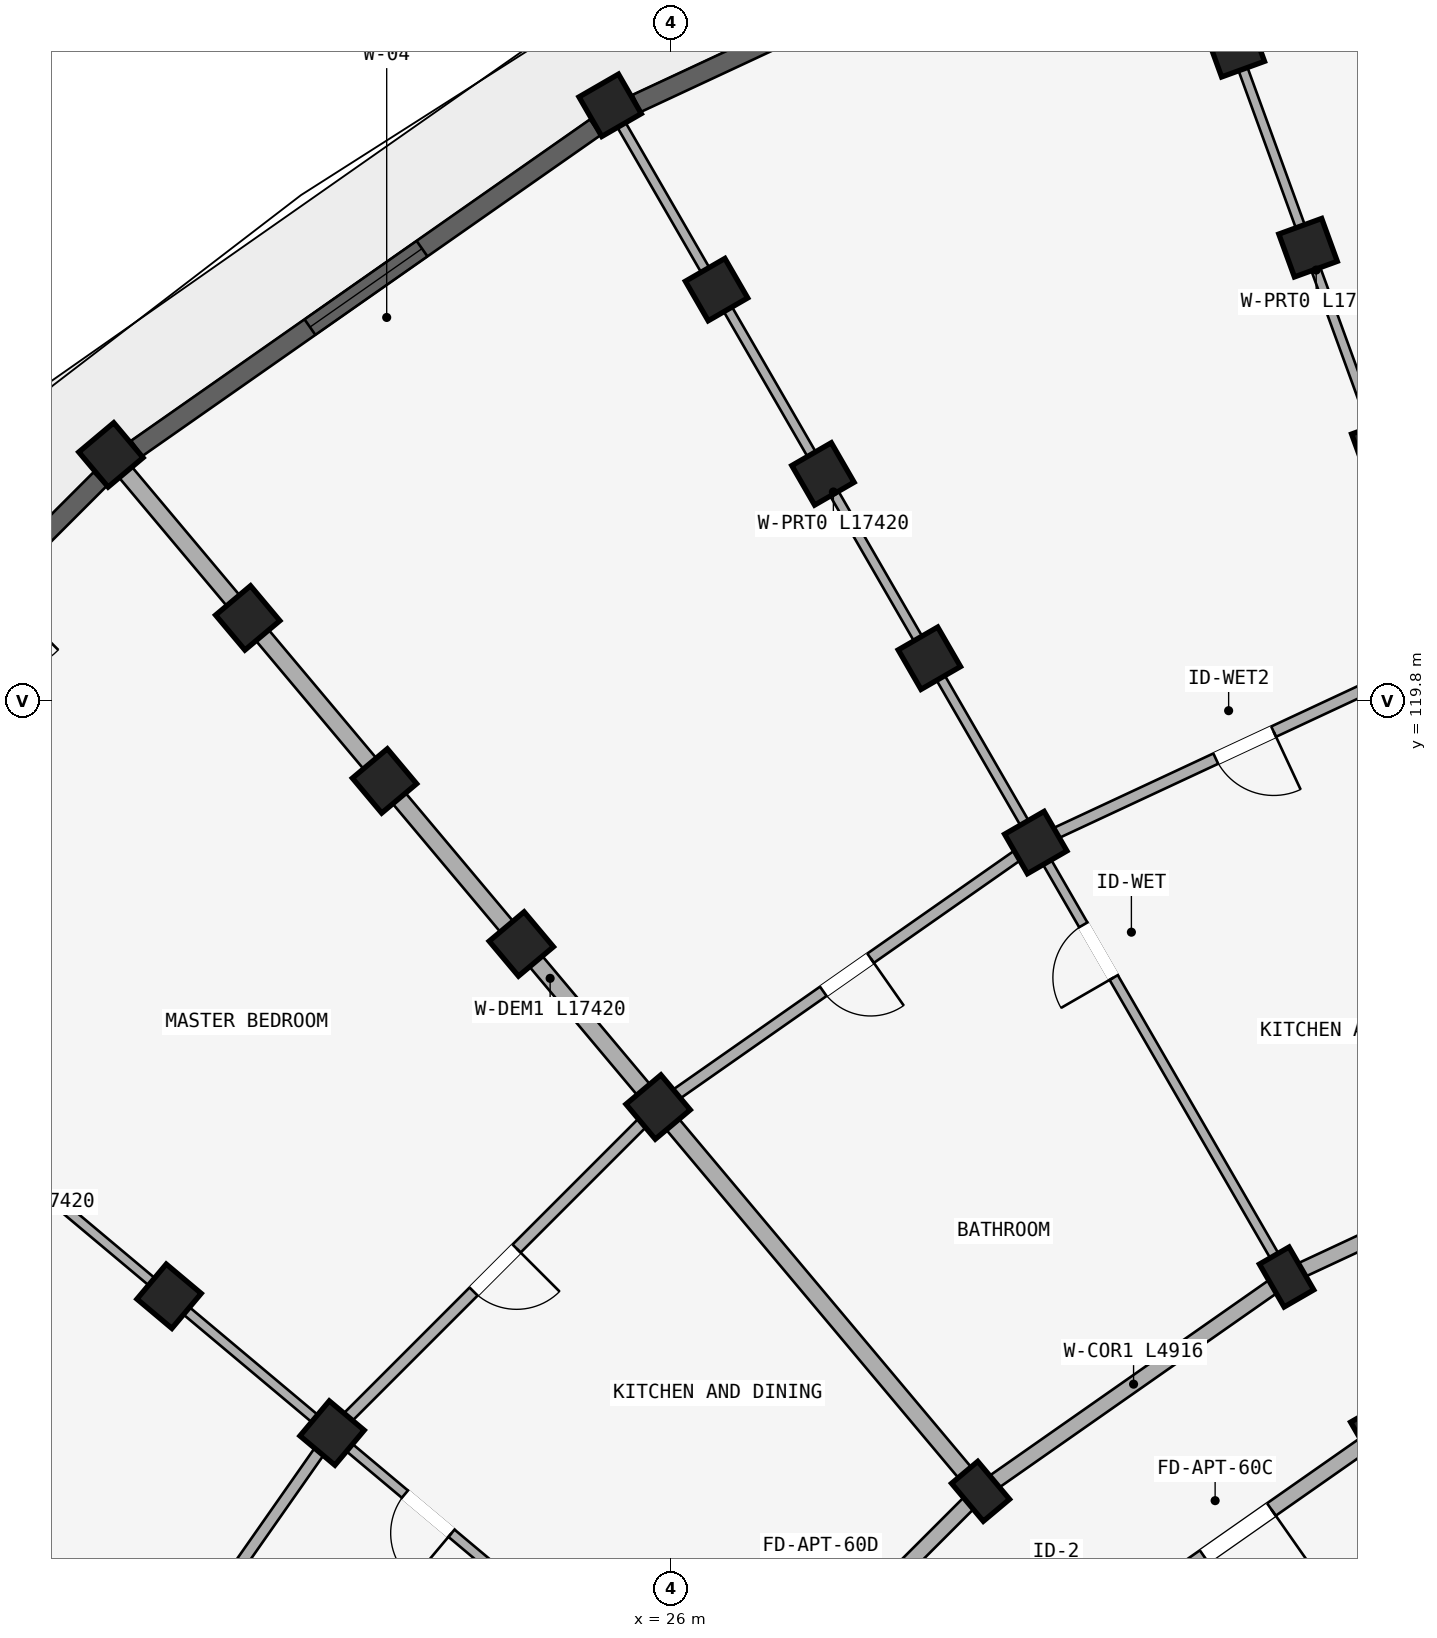
"""IFC4 building model, lengths in metres.
Left out: names, types, materials, properties, quantities, classifications, styles, units other than length and angle.
Written with IfcOpenShell. Run it as: python <this file> out.ifc"""

import sys

from ifc_helpers import new_model, si_unit, direction, frame, frame_2d, origin, origin_2d, place, context, subcontext, project, spatial, rectangle, extrude, element, fill, save


model = new_model("IFC4")
c1 = context("Model", 3, precision=1e-05, world=origin(), true_north=direction((0.0, 1.0)))
c2 = subcontext(c1, "Body", "Model", "MODEL_VIEW")
j1 = project(units=[si_unit("LENGTHUNIT", "METRE"), si_unit("PLANEANGLEUNIT", "RADIAN")], contexts=[c1])
p1 = place(None, origin())
s1 = spatial("IfcSite", under=j1, at=p1, CompositionType="ELEMENT")
p2 = place(p1, origin())
s2 = spatial("IfcBuilding", under=s1, at=p2, CompositionType="ELEMENT")
p3 = place(p2, frame((0.0, 0.0, 37.05)))
s3 = spatial("IfcBuildingStorey", under=s2, at=p3, CompositionType="ELEMENT", Elevation=37.05)
for number, where, z_axis, x_axis in (
    (1, (35.34, 123.132, 0.0), (0.0, 0.0, 1.0), (0.94, 0.342, 0.0)),
    (2, (34.382, 125.764, 0.0), (0.0, 0.0, 1.0), (0.94, 0.342, 0.0)),
    (3, (33.425, 128.395, 0.0), (0.0, 0.0, 1.0), (0.94, 0.342, 0.0)),
):
    element("IfcColumn", number, at=place(p3, frame(where, z_axis=z_axis, x_axis=x_axis)), inside=s3, PredefinedType="COLUMN", context=c2, shape_type="SweptSolid", body=[
        extrude(rectangle(XDim=0.6, YDim=0.6, at=origin_2d()), origin(), (0.0, 0.0, 1.0), 2.93),
    ])
for number, where, z_axis, x_axis in (
    (4, (35.3, 110.144, 0.0), (0.0, 0.0, 1.0), (0.866, 0.5, 0.0)),
    (5, (34.1, 112.222, 0.0), (0.0, 0.0, 1.0), (0.866, 0.5, 0.0)),
):
    element("IfcColumn", number, at=place(p3, frame(where, z_axis=z_axis, x_axis=x_axis)), inside=s3, PredefinedType="COLUMN", context=c2, shape_type="SweptSolid", body=[
        extrude(rectangle(XDim=0.45, YDim=0.65, at=origin_2d()), origin(), (0.0, 0.0, 1.0), 2.93),
    ])
for number, where, z_axis, x_axis in (
    (6, (30.8, 117.938, 0.0), (0.0, 0.0, 1.0), (0.866, 0.5, 0.0)),
    (7, (29.4, 120.363, 0.0), (0.0, 0.0, 1.0), (0.866, 0.5, 0.0)),
    (8, (28.0, 122.787, 0.0), (0.0, 0.0, 1.0), (0.866, 0.5, 0.0)),
    (9, (26.6, 125.212, 0.0), (0.0, 0.0, 1.0), (0.866, 0.5, 0.0)),
):
    element("IfcColumn", number, at=place(p3, frame(where, z_axis=z_axis, x_axis=x_axis)), inside=s3, PredefinedType="COLUMN", context=c2, shape_type="SweptSolid", body=[
        extrude(rectangle(XDim=0.6, YDim=0.6, at=origin_2d()), origin(), (0.0, 0.0, 1.0), 2.93),
    ])
p4 = place(p3, frame((25.2, 127.637, 0.0), z_axis=(0.0, 0.0, 1.0), x_axis=(0.866025403784, 0.5, 0.0)))
e10 = element("IfcColumn", 10, at=p4, inside=s3, PredefinedType="COLUMN", context=c2, shape_type="SweptSolid", body=[
    extrude(rectangle(XDim=0.6, YDim=0.6, at=origin_2d()), origin(), (0.0, 0.0, 1.0), 2.97),
])
p5 = place(p3, frame((30.073, 109.402, 0.0), z_axis=(0.0, 0.0, 1.0), x_axis=(0.766044443119, 0.642787609687, 0.0)))
e11 = element("IfcColumn", 11, at=p5, inside=s3, PredefinedType="COLUMN", context=c2, shape_type="SweptSolid", body=[
    extrude(rectangle(XDim=0.45, YDim=0.65, at=origin_2d()), origin(), (0.0, 0.0, 1.0), 2.93),
])
for number, where, z_axis, x_axis in (
    (12, (25.831, 114.458, 0.0), (0.0, 0.0, 1.0), (0.766, 0.643, 0.0)),
    (13, (24.031, 116.603, 0.0), (0.0, 0.0, 1.0), (0.766, 0.643, 0.0)),
    (14, (22.231, 118.748, 0.0), (0.0, 0.0, 1.0), (0.766, 0.643, 0.0)),
    (15, (20.432, 120.893, 0.0), (0.0, 0.0, 1.0), (0.766, 0.643, 0.0)),
):
    element("IfcColumn", number, at=place(p3, frame(where, z_axis=z_axis, x_axis=x_axis)), inside=s3, PredefinedType="COLUMN", context=c2, shape_type="SweptSolid", body=[
        extrude(rectangle(XDim=0.6, YDim=0.6, at=origin_2d()), origin(), (0.0, 0.0, 1.0), 2.93),
    ])
p6 = place(p3, frame((18.632, 123.038, 0.0), z_axis=(0.0, 0.0, 1.0), x_axis=(0.766044443119, 0.642787609687, 0.0)))
e16 = element("IfcColumn", 16, at=p6, inside=s3, PredefinedType="COLUMN", context=c2, shape_type="SweptSolid", body=[
    extrude(rectangle(XDim=0.6, YDim=0.6, at=origin_2d()), origin(), (0.0, 0.0, 1.0), 2.97),
])
for number, where, z_axis, x_axis in (
    (17, (21.542, 110.169, 0.0), (0.0, 0.0, 1.0), (0.643, 0.766, 0.0)),
    (18, (19.397, 111.969, 0.0), (0.0, 0.0, 1.0), (0.643, 0.766, 0.0)),
):
    element("IfcColumn", number, at=place(p3, frame(where, z_axis=z_axis, x_axis=x_axis)), inside=s3, PredefinedType="COLUMN", context=c2, shape_type="SweptSolid", body=[
        extrude(rectangle(XDim=0.6, YDim=0.6, at=origin_2d()), origin(), (0.0, 0.0, 1.0), 2.93),
    ])
p7 = place(p3, frame((38.555, 114.299, 0.0), z_axis=(0.0, 0.0, 1.0), x_axis=(-0.906302381024, -0.422629854778, 0.0)))
e19 = element("IfcWall", 19, at=p7, inside=s3, PredefinedType="STANDARD", context=c2, shape_type="SweptSolid", body=[
    extrude(rectangle(XDim=4.915, YDim=0.2, at=frame_2d((2.458, 0.0))), origin(), (0.0, 0.0, 1.0), 2.372),
])
p8 = place(p3, frame((35.3, 110.144, 0.0), z_axis=(0.0, 0.0, 1.0), x_axis=(-0.819155404658, -0.573571637217, 0.0)))
e20 = element("IfcWall", 20, at=p8, inside=s3, PredefinedType="STANDARD", context=c2, shape_type="SweptSolid", body=[
    extrude(rectangle(XDim=4.497, YDim=0.2, at=frame_2d((2.249, 0.0))), origin(), (0.0, 0.0, 1.0), 2.372),
])
p9 = place(p8, frame((1.709, 0.0, 0.0)))
e21 = element("IfcOpeningElement", 21, at=p9, cuts=e20, PredefinedType="OPENING", context=c2, shape_type="SweptSolid", body=[
    extrude(rectangle(XDim=1.08, YDim=2.15, at=frame_2d((0.54, 1.075))), frame((0.0, 0.11, 0.0), z_axis=(0.0, -1.0, 0.0), x_axis=(1.0, 0.0, 0.0)), (0.0, 0.0, 1.0), 0.22),
])
p10 = place(p3, frame((34.1, 112.222, 0.0), z_axis=(0.0, 0.0, 1.0), x_axis=(-0.819140911474, -0.573592335331, 0.0)))
e22 = element("IfcWall", 22, at=p10, inside=s3, PredefinedType="STANDARD", context=c2, shape_type="SweptSolid", body=[
    extrude(rectangle(XDim=4.916, YDim=0.2, at=frame_2d((2.458, 0.0))), origin(), (0.0, 0.0, 1.0), 2.372),
])
p11 = place(p3, frame((30.073, 109.402, 0.0), z_axis=(0.0, 0.0, 1.0), x_axis=(-0.707106781187, -0.707106781187, 0.0)))
e23 = element("IfcWall", 23, at=p11, inside=s3, PredefinedType="STANDARD", context=c2, shape_type="SweptSolid", body=[
    extrude(rectangle(XDim=4.916, YDim=0.2, at=frame_2d((2.458, 0.0))), origin(), (0.0, 0.0, 1.0), 2.372),
])
p12 = place(p11, frame((1.888, 0.0, 0.0)))
e24 = element("IfcOpeningElement", 24, at=p12, cuts=e23, PredefinedType="OPENING", context=c2, shape_type="SweptSolid", body=[
    extrude(rectangle(XDim=1.14, YDim=2.15, at=frame_2d((0.57, 1.075))), frame((0.0, 0.11, 0.0), z_axis=(0.0, -1.0, 0.0), x_axis=(1.0, 0.0, 0.0)), (0.0, 0.0, 1.0), 0.22),
])
p13 = place(p3, frame((38.521, 114.393, 0.0), z_axis=(0.0, 0.0, 1.0), x_axis=(-0.342022120477, 0.939691901159, 0.0)))
e25 = element("IfcWall", 25, at=p13, inside=s3, PredefinedType="PARTITIONING", context=c2, shape_type="SweptSolid", body=[
    extrude(rectangle(XDim=17.42, YDim=0.125, at=frame_2d((8.71, 0.0))), origin(), (0.0, 0.0, 1.0), 2.372),
])
p14 = place(p13, frame((4.45, 0.0, 0.0)))
e26 = element("IfcOpeningElement", 26, at=p14, cuts=e25, PredefinedType="OPENING", context=c2, shape_type="SweptSolid", body=[
    extrude(rectangle(XDim=0.8, YDim=2.1, at=frame_2d((0.4, 1.05))), frame((0.0, 0.073, 0.0), z_axis=(0.0, -1.0, 0.0), x_axis=(1.0, 0.0, 0.0)), (0.0, 0.0, 1.0), 0.145),
])
p15 = place(p3, frame((34.05, 112.309, 0.0), z_axis=(0.0, 0.0, 1.0), x_axis=(-0.499997843263, 0.866026648973, 0.0)))
e27 = element("IfcWall", 27, at=p15, inside=s3, PredefinedType="PARTITIONING", context=c2, shape_type="SweptSolid", body=[
    extrude(rectangle(XDim=17.42, YDim=0.125, at=frame_2d((8.71, 0.0))), origin(), (0.0, 0.0, 1.0), 2.372),
])
p16 = place(p15, frame((4.45, 0.0, 0.0)))
e28 = element("IfcOpeningElement", 28, at=p16, cuts=e27, PredefinedType="OPENING", context=c2, shape_type="SweptSolid", body=[
    extrude(rectangle(XDim=0.8, YDim=2.1, at=frame_2d((0.4, 1.05))), frame((0.0, 0.073, 0.0), z_axis=(0.0, -1.0, 0.0), x_axis=(1.0, 0.0, 0.0)), (0.0, 0.0, 1.0), 0.145),
])
p17 = place(p3, frame((30.009, 109.479, 0.0), z_axis=(0.0, 0.0, 1.0), x_axis=(-0.642784757967, 0.766046835987, 0.0)))
e29 = element("IfcWall", 29, at=p17, inside=s3, PredefinedType="STANDARD", context=c2, shape_type="SweptSolid", body=[
    extrude(rectangle(XDim=17.42, YDim=0.22, at=frame_2d((8.71, 0.0))), origin(), (0.0, 0.0, 1.0), 2.372),
])
p18 = place(p3, frame((26.521, 105.991, 0.0), z_axis=(0.0, 0.0, 1.0), x_axis=(-0.766046835987, 0.642784757967, 0.0)))
e30 = element("IfcWall", 30, at=p18, inside=s3, PredefinedType="PARTITIONING", context=c2, shape_type="SweptSolid", body=[
    extrude(rectangle(XDim=17.42, YDim=0.125, at=frame_2d((8.71, 0.0))), origin(), (0.0, 0.0, 1.0), 2.372),
])
p19 = place(p18, frame((4.45, 0.0, 0.0)))
e31 = element("IfcOpeningElement", 31, at=p19, cuts=e30, PredefinedType="OPENING", context=c2, shape_type="SweptSolid", body=[
    extrude(rectangle(XDim=0.8, YDim=2.1, at=frame_2d((0.4, 1.05))), frame((0.0, 0.073, 0.0), z_axis=(0.0, -1.0, 0.0), x_axis=(1.0, 0.0, 0.0)), (0.0, 0.0, 1.0), 0.145),
])
p20 = place(p3, frame((23.691, 101.95, 0.0), z_axis=(0.0, 0.0, 1.0), x_axis=(-0.866026648973, 0.499997843263, 0.0)))
e32 = element("IfcWall", 32, at=p20, inside=s3, PredefinedType="STANDARD", context=c2, shape_type="SweptSolid", body=[
    extrude(rectangle(XDim=17.42, YDim=0.22, at=frame_2d((8.71, 0.0))), origin(), (0.0, 0.0, 1.0), 2.372),
])
p21 = place(p3, frame((36.298, 120.501, 0.0), z_axis=(0.0, 0.0, 1.0), x_axis=(-0.906312656069, -0.42260781991, 0.0)))
e33 = element("IfcWall", 33, at=p21, inside=s3, PredefinedType="PLUMBINGWALL", context=c2, shape_type="SweptSolid", body=[
    extrude(rectangle(XDim=6.066, YDim=0.15, at=frame_2d((3.033, 0.0))), origin(), (0.0, 0.0, 1.0), 2.372),
])
p22 = place(p21, frame((2.613, 0.0, 0.0)))
e34 = element("IfcOpeningElement", 34, at=p22, cuts=e33, PredefinedType="OPENING", context=c2, shape_type="SweptSolid", body=[
    extrude(rectangle(XDim=0.84, YDim=2.1, at=frame_2d((0.42, 1.05))), frame((0.0, 0.085, 0.0), z_axis=(0.0, -1.0, 0.0), x_axis=(1.0, 0.0, 0.0)), (0.0, 0.0, 1.0), 0.17),
])
p23 = place(p3, frame((30.8, 117.938, 0.0), z_axis=(0.0, 0.0, 1.0), x_axis=(-0.81913926159, -0.573594691504, 0.0)))
e35 = element("IfcWall", 35, at=p23, inside=s3, PredefinedType="PLUMBINGWALL", context=c2, shape_type="SweptSolid", body=[
    extrude(rectangle(XDim=6.066, YDim=0.15, at=frame_2d((3.033, 0.0))), origin(), (0.0, 0.0, 1.0), 2.372),
])
p24 = place(p23, frame((2.653, 0.0, 0.0)))
e36 = element("IfcOpeningElement", 36, at=p24, cuts=e35, PredefinedType="OPENING", context=c2, shape_type="SweptSolid", body=[
    extrude(rectangle(XDim=0.76, YDim=2.05, at=frame_2d((0.38, 1.025))), frame((0.0, 0.085, 0.0), z_axis=(0.0, -1.0, 0.0), x_axis=(1.0, 0.0, 0.0)), (0.0, 0.0, 1.0), 0.17),
])
p25 = place(p3, frame((25.831, 114.458, 0.0), z_axis=(0.0, 0.0, 1.0), x_axis=(-0.707106781187, -0.707106781187, 0.0)))
e37 = element("IfcWall", 37, at=p25, inside=s3, PredefinedType="PLUMBINGWALL", context=c2, shape_type="SweptSolid", body=[
    extrude(rectangle(XDim=6.066, YDim=0.15, at=frame_2d((3.033, 0.0))), origin(), (0.0, 0.0, 1.0), 2.372),
])
p26 = place(p25, frame((2.633, 0.0, 0.0)))
e38 = element("IfcOpeningElement", 38, at=p26, cuts=e37, PredefinedType="OPENING", context=c2, shape_type="SweptSolid", body=[
    extrude(rectangle(XDim=0.8, YDim=2.1, at=frame_2d((0.4, 1.05))), frame((0.0, 0.085, 0.0), z_axis=(0.0, -1.0, 0.0), x_axis=(1.0, 0.0, 0.0)), (0.0, 0.0, 1.0), 0.17),
])
p27 = place(p3, frame((21.542, 110.169, 0.0), z_axis=(0.0, 0.0, 1.0), x_axis=(-0.573594691504, -0.81913926159, 0.0)))
e39 = element("IfcWall", 39, at=p27, inside=s3, PredefinedType="PLUMBINGWALL", context=c2, shape_type="SweptSolid", body=[
    extrude(rectangle(XDim=6.066, YDim=0.15, at=frame_2d((3.033, 0.0))), origin(), (0.0, 0.0, 1.0), 2.372),
])
p28 = place(p27, frame((2.613, 0.0, 0.0)))
e40 = element("IfcOpeningElement", 40, at=p28, cuts=e39, PredefinedType="OPENING", context=c2, shape_type="SweptSolid", body=[
    extrude(rectangle(XDim=0.84, YDim=2.1, at=frame_2d((0.42, 1.05))), frame((0.0, 0.085, 0.0), z_axis=(0.0, -1.0, 0.0), x_axis=(1.0, 0.0, 0.0)), (0.0, 0.0, 1.0), 0.17),
])
p29 = place(p3, frame((32.225, 130.775, 0.0), z_axis=(0.0, 0.0, 1.0), x_axis=(-0.906321090675, -0.422589730823, 0.0)))
e41 = element("IfcWall", 41, at=p29, inside=s3, PredefinedType="STANDARD", context=c2, shape_type="SweptSolid", body=[
    extrude(rectangle(XDim=7.367, YDim=0.25, at=frame_2d((3.684, 0.0))), origin(), (0.0, 0.0, 1.0), 2.412),
])
p30 = place(p29, frame((2.858, 0.0, 0.462)))
e42 = element("IfcOpeningElement", 42, at=p30, cuts=e41, PredefinedType="OPENING", context=c2, shape_type="SweptSolid", body=[
    extrude(rectangle(XDim=1.65, YDim=1.75, at=frame_2d((0.825, 0.875))), frame((0.0, 0.135, 0.0), z_axis=(0.0, -1.0, 0.0), x_axis=(1.0, 0.0, 0.0)), (0.0, 0.0, 1.0), 0.27),
])
p31 = place(p3, frame((25.005, 127.348, 0.0), z_axis=(0.0, 0.0, 1.0), x_axis=(-0.819147839112, -0.573582441919, 0.0)))
e43 = element("IfcWall", 43, at=p31, inside=s3, PredefinedType="STANDARD", context=c2, shape_type="SweptSolid", body=[
    extrude(rectangle(XDim=7.367, YDim=0.25, at=frame_2d((3.684, 0.0))), origin(), (0.0, 0.0, 1.0), 2.412),
])
p32 = place(p31, frame((2.783, 0.0, 0.562)))
e44 = element("IfcOpeningElement", 44, at=p32, cuts=e43, PredefinedType="OPENING", context=c2, shape_type="SweptSolid", body=[
    extrude(rectangle(XDim=1.8, YDim=1.65, at=frame_2d((0.9, 0.825))), frame((0.0, 0.135, 0.0), z_axis=(0.0, -1.0, 0.0), x_axis=(1.0, 0.0, 0.0)), (0.0, 0.0, 1.0), 0.27),
])
p33 = place(p3, frame((18.49, 122.719, 0.0), z_axis=(0.0, 0.0, 1.0), x_axis=(-0.707106781187, -0.707106781187, 0.0)))
e45 = element("IfcWall", 45, at=p33, inside=s3, PredefinedType="STANDARD", context=c2, shape_type="SweptSolid", body=[
    extrude(rectangle(XDim=7.367, YDim=0.25, at=frame_2d((3.684, 0.0))), origin(), (0.0, 0.0, 1.0), 2.412),
])
p34 = place(p33, frame((4.84, 0.0, 0.412)))
e46 = element("IfcOpeningElement", 46, at=p34, cuts=e45, PredefinedType="OPENING", context=c2, shape_type="SweptSolid", body=[
    extrude(rectangle(XDim=1.2, YDim=1.5, at=frame_2d((0.6, 0.75))), frame((0.0, 0.135, 0.0), z_axis=(0.0, -1.0, 0.0), x_axis=(1.0, 0.0, 0.0)), (0.0, 0.0, 1.0), 0.27),
])
p35 = place(p33, frame((1.979, 0.0, 0.0)))
e47 = element("IfcOpeningElement", 47, at=p35, cuts=e45, PredefinedType="OPENING", context=c2, shape_type="SweptSolid", body=[
    extrude(rectangle(XDim=1.2, YDim=2.15, at=frame_2d((0.6, 1.075))), frame((0.0, 0.135, 0.0), z_axis=(0.0, -1.0, 0.0), x_axis=(1.0, 0.0, 0.0)), (0.0, 0.0, 1.0), 0.27),
])
p36 = place(p32, origin())
e48 = element("IfcWindow", 48, at=p36, inside=s3, PartitioningType="DOUBLE_PANEL_VERTICAL", PredefinedType="WINDOW", context=c2, shape_type="SweptSolid", body=[
    extrude(rectangle(XDim=1.8, YDim=1.65, at=frame_2d((0.9, 0.825))), frame((0.0, 0.03, 0.0), z_axis=(0.0, -1.0, 0.0), x_axis=(1.0, 0.0, 0.0)), (0.0, 0.0, 1.0), 0.06),
])
fill(e44, e48)
p37 = place(p16, origin())
e49 = element("IfcDoor", 49, at=p37, inside=s3, OperationType="SINGLE_SWING_LEFT", PredefinedType="DOOR", context=c2, shape_type="SweptSolid", body=[
    extrude(rectangle(XDim=0.8, YDim=2.1, at=frame_2d((0.4, 1.05))), frame((0.0, 0.025, 0.0), z_axis=(0.0, -1.0, 0.0), x_axis=(1.0, 0.0, 0.0)), (0.0, 0.0, 1.0), 0.05),
])
fill(e28, e49)
p38 = place(p19, frame((0.8, 0.0, 0.0), z_axis=(0.0, 0.0, 1.0), x_axis=(-1.0, 0.0, 0.0)))
e50 = element("IfcDoor", 50, at=p38, inside=s3, OperationType="SINGLE_SWING_RIGHT", PredefinedType="DOOR", context=c2, shape_type="SweptSolid", body=[
    extrude(rectangle(XDim=0.8, YDim=2.1, at=frame_2d((0.4, 1.05))), frame((0.0, 0.025, 0.0), z_axis=(0.0, -1.0, 0.0), x_axis=(1.0, 0.0, 0.0)), (0.0, 0.0, 1.0), 0.05),
])
fill(e31, e50)
p39 = place(p22, origin())
e51 = element("IfcDoor", 51, at=p39, inside=s3, OperationType="SINGLE_SWING_LEFT", PredefinedType="DOOR", context=c2, shape_type="SweptSolid", body=[
    extrude(rectangle(XDim=0.84, YDim=2.1, at=frame_2d((0.42, 1.05))), frame((0.0, 0.025, 0.0), z_axis=(0.0, -1.0, 0.0), x_axis=(1.0, 0.0, 0.0)), (0.0, 0.0, 1.0), 0.05),
])
fill(e34, e51)
p40 = place(p24, frame((0.76, 0.0, 0.0), z_axis=(0.0, 0.0, 1.0), x_axis=(-1.0, 0.0, 0.0)))
e52 = element("IfcDoor", 52, at=p40, inside=s3, OperationType="SINGLE_SWING_RIGHT", PredefinedType="DOOR", context=c2, shape_type="SweptSolid", body=[
    extrude(rectangle(XDim=0.76, YDim=2.05, at=frame_2d((0.38, 1.025))), frame((0.0, 0.025, 0.0), z_axis=(0.0, -1.0, 0.0), x_axis=(1.0, 0.0, 0.0)), (0.0, 0.0, 1.0), 0.05),
])
fill(e36, e52)
p41 = place(p26, frame((0.8, 0.0, 0.0), z_axis=(0.0, 0.0, 1.0), x_axis=(-1.0, 0.0, 0.0)))
e53 = element("IfcDoor", 53, at=p41, inside=s3, OperationType="SINGLE_SWING_RIGHT", PredefinedType="DOOR", context=c2, shape_type="SweptSolid", body=[
    extrude(rectangle(XDim=0.8, YDim=2.1, at=frame_2d((0.4, 1.05))), frame((0.0, 0.025, 0.0), z_axis=(0.0, -1.0, 0.0), x_axis=(1.0, 0.0, 0.0)), (0.0, 0.0, 1.0), 0.05),
])
fill(e38, e53)
p42 = place(p9, origin())
e54 = element("IfcDoor", 54, at=p42, inside=s3, OperationType="SINGLE_SWING_LEFT", PredefinedType="DOOR", context=c2, shape_type="SweptSolid", body=[
    extrude(rectangle(XDim=1.08, YDim=2.15, at=frame_2d((0.54, 1.075))), frame((0.0, 0.025, 0.0), z_axis=(0.0, -1.0, 0.0), x_axis=(1.0, 0.0, 0.0)), (0.0, 0.0, 1.0), 0.05),
])
fill(e21, e54)
save(model, sys.argv[1])
